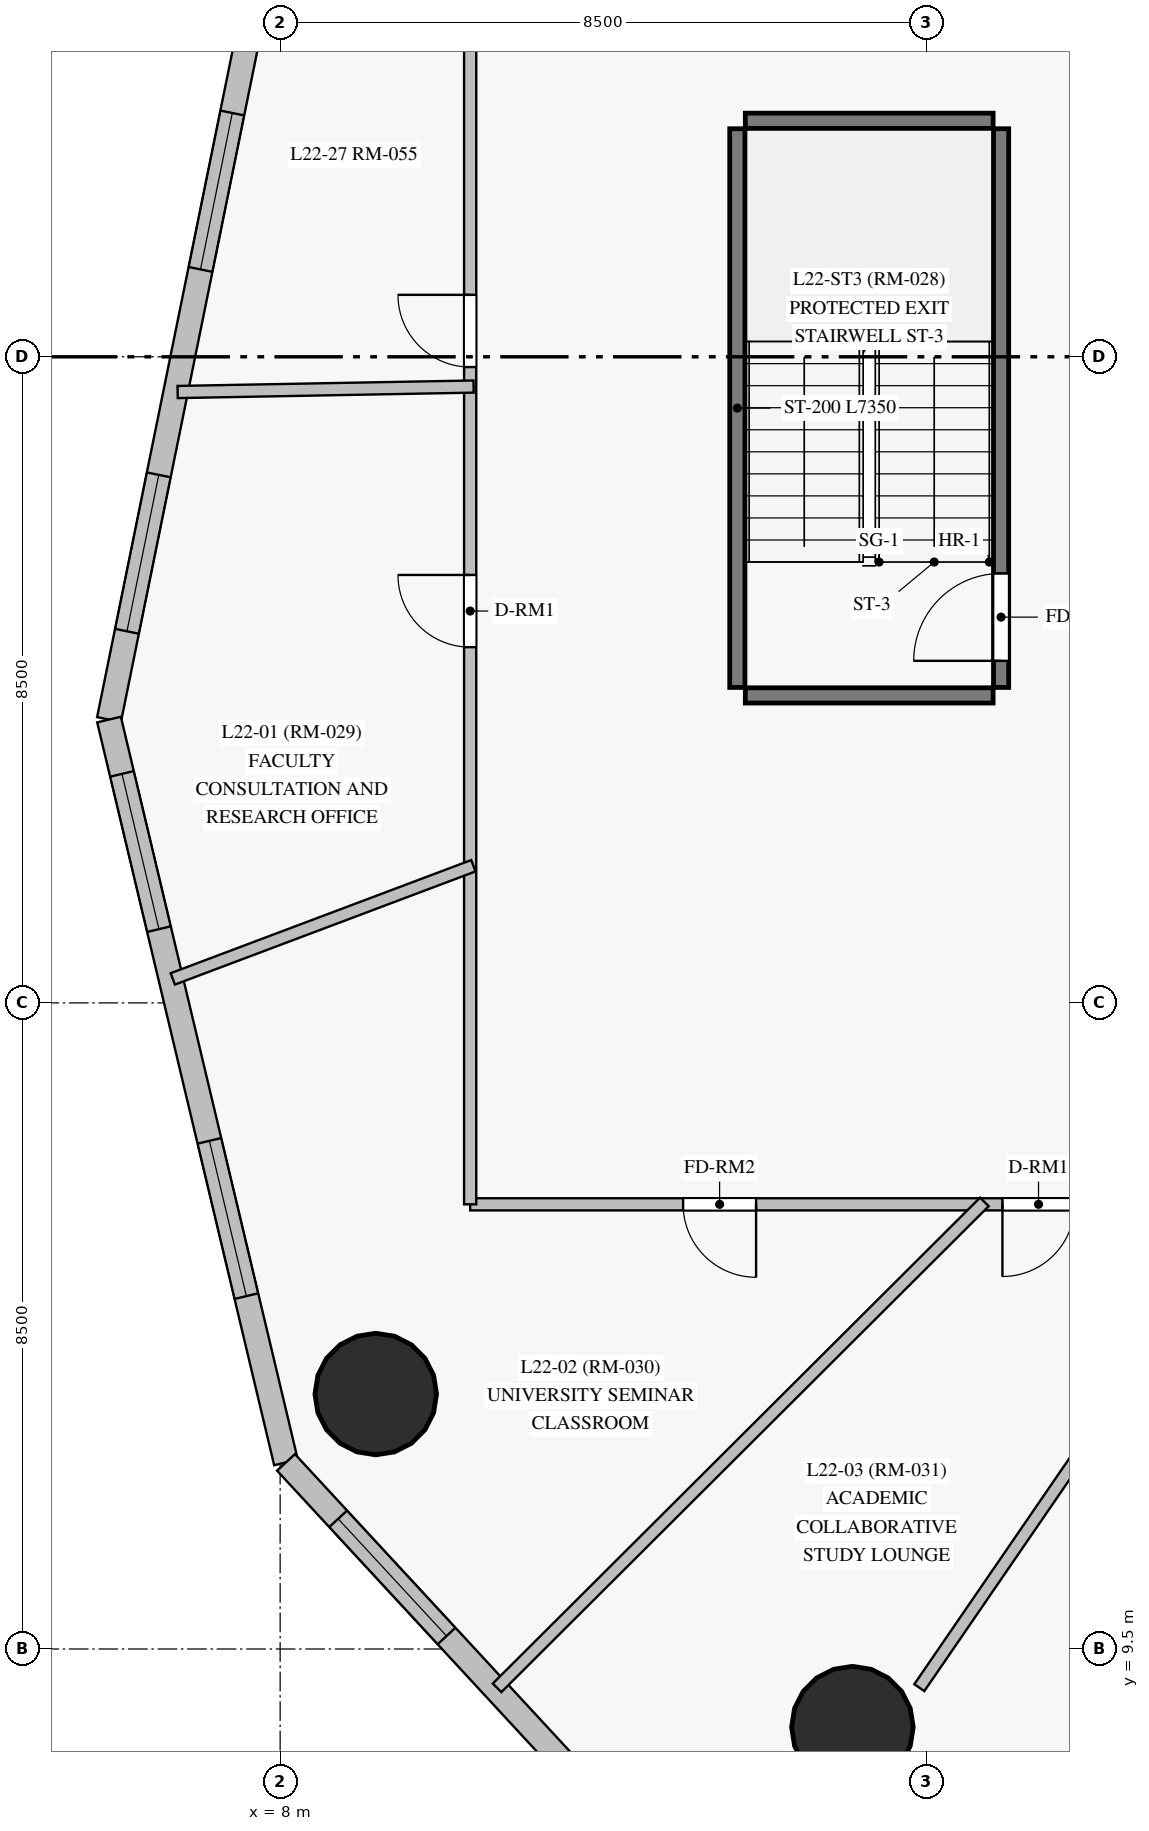
"""IFC4 building model, lengths in metres.
Left out: names, types, materials, properties, quantities, classifications, styles, units other than length and angle.
Written with IfcOpenShell. Run it as: python <this file> out.ifc"""

import sys

from ifc_helpers import new_model, si_unit, direction, frame, frame_2d, origin, origin_with_axes, origin_2d, place, context, subcontext, project, spatial, rectangle, circle, extrude, source, transform, mapped, element, fill, save


model = new_model("IFC4")
c1 = context("Model", 3, precision=1e-05, world=origin(), true_north=direction((0.0, 1.0)))
c2 = subcontext(c1, "Body", "Model", "MODEL_VIEW")
j1 = project(units=[si_unit("LENGTHUNIT", "METRE"), si_unit("PLANEANGLEUNIT", "RADIAN")], contexts=[c1])
p1 = place(None, origin())
s1 = spatial("IfcSite", under=j1, at=p1, CompositionType="ELEMENT")
p2 = place(p1, origin())
s2 = spatial("IfcBuilding", under=s1, at=p2, CompositionType="ELEMENT")
p3 = place(p2, frame((0.0, 0.0, 84.1)))
s3 = spatial("IfcBuildingStorey", under=s2, at=p3, CompositionType="ELEMENT", Elevation=84.1)
m1 = source(origin_with_axes(), c2, "Body", "SweptSolid", [
    extrude(circle(Radius=0.8, at=origin_2d()), origin(), (0.0, 0.0, 1.0), 3.6),
])
for number, where, z_axis, x_axis in (
    (1, (9.258, 12.854, 0.0), (0.0, 0.0, 1.0), (1.0, 0.0, 0.0)),
    (2, (15.529, 8.472, 0.0), (0.0, 0.0, 1.0), (1.0, 0.0, 0.0)),
):
    element("IfcColumn", number, at=place(p3, frame(where, z_axis=z_axis, x_axis=x_axis)), inside=s3, PredefinedType="COLUMN", context=c2, shape_type="MappedRepresentation", body=[
        mapped(m1, transform((0.0, 0.0, 0.0), scale=1.0)),
    ])
p4 = place(p3, frame((8.649, 35.997, 0.0), z_axis=(0.0, 0.0, 1.0), x_axis=(-0.199165339699, -0.979965901173, 0.0)))
e3 = element("IfcWall", 3, at=p4, inside=s3, PredefinedType="SOLIDWALL", context=c2, shape_type="SweptSolid", body=[
    extrude(rectangle(XDim=14.562, YDim=0.32, at=frame_2d((7.281, 0.0))), origin(), (0.0, 0.0, 1.0), 3.325),
])
p5 = place(p4, frame((1.693, 0.0, 0.85)))
e4 = element("IfcOpeningElement", 4, at=p5, cuts=e3, PredefinedType="OPENING", context=c2, shape_type="SweptSolid", body=[
    extrude(rectangle(XDim=2.1, YDim=1.95, at=frame_2d((1.05, 0.975))), frame((0.0, 0.17, 0.0), z_axis=(0.0, -1.0, 0.0), x_axis=(1.0, 0.0, 0.0)), (0.0, 0.0, 1.0), 0.34),
])
p6 = place(p4, frame((6.418, 0.0, 0.85)))
e5 = element("IfcOpeningElement", 5, at=p6, cuts=e3, PredefinedType="OPENING", context=c2, shape_type="SweptSolid", body=[
    extrude(rectangle(XDim=2.1, YDim=1.95, at=frame_2d((1.05, 0.975))), frame((0.0, 0.17, 0.0), z_axis=(0.0, -1.0, 0.0), x_axis=(1.0, 0.0, 0.0)), (0.0, 0.0, 1.0), 0.34),
])
p7 = place(p4, frame((11.276, 0.0, 0.85)))
e6 = element("IfcOpeningElement", 6, at=p7, cuts=e3, PredefinedType="OPENING", context=c2, shape_type="SweptSolid", body=[
    extrude(rectangle(XDim=2.1, YDim=1.95, at=frame_2d((1.05, 0.975))), frame((0.0, 0.17, 0.0), z_axis=(0.0, -1.0, 0.0), x_axis=(1.0, 0.0, 0.0)), (0.0, 0.0, 1.0), 0.34),
])
p8 = place(p3, frame((5.749, 21.728, 0.0), z_axis=(0.0, 0.0, 1.0), x_axis=(0.231742086711, -0.972777263944, 0.0)))
e7 = element("IfcWall", 7, at=p8, inside=s3, PredefinedType="SOLIDWALL", context=c2, shape_type="SweptSolid", body=[
    extrude(rectangle(XDim=10.046, YDim=0.32, at=frame_2d((5.023, 0.0))), origin(), (0.0, 0.0, 1.0), 3.325),
])
p9 = place(p8, frame((0.735, 0.0, 0.85)))
e8 = element("IfcOpeningElement", 8, at=p9, cuts=e7, PredefinedType="OPENING", context=c2, shape_type="SweptSolid", body=[
    extrude(rectangle(XDim=2.1, YDim=1.95, at=frame_2d((1.05, 0.975))), frame((0.0, 0.17, 0.0), z_axis=(0.0, -1.0, 0.0), x_axis=(1.0, 0.0, 0.0)), (0.0, 0.0, 1.0), 0.34),
])
p10 = place(p8, frame((5.698, 0.0, 0.85)))
e9 = element("IfcOpeningElement", 9, at=p10, cuts=e7, PredefinedType="OPENING", context=c2, shape_type="SweptSolid", body=[
    extrude(rectangle(XDim=2.1, YDim=1.95, at=frame_2d((1.05, 0.975))), frame((0.0, 0.17, 0.0), z_axis=(0.0, -1.0, 0.0), x_axis=(1.0, 0.0, 0.0)), (0.0, 0.0, 1.0), 0.34),
])
p11 = place(p3, frame((8.077, 11.955, 0.0), z_axis=(0.0, 0.0, 1.0), x_axis=(0.678985658744, -0.734151534235, 0.0)))
e10 = element("IfcWall", 10, at=p11, inside=s3, PredefinedType="SOLIDWALL", context=c2, shape_type="SweptSolid", body=[
    extrude(rectangle(XDim=12.498, YDim=0.32, at=frame_2d((6.249, 0.0))), origin(), (0.0, 0.0, 1.0), 3.325),
])
p12 = place(p11, frame((1.011, 0.0, 0.85)))
e11 = element("IfcOpeningElement", 11, at=p12, cuts=e10, PredefinedType="OPENING", context=c2, shape_type="SweptSolid", body=[
    extrude(rectangle(XDim=2.1, YDim=1.95, at=frame_2d((1.05, 0.975))), frame((0.0, 0.17, 0.0), z_axis=(0.0, -1.0, 0.0), x_axis=(1.0, 0.0, 0.0)), (0.0, 0.0, 1.0), 0.34),
])
p13 = place(p11, frame((5.356, 0.0, 0.85)))
e12 = element("IfcOpeningElement", 12, at=p13, cuts=e10, PredefinedType="OPENING", context=c2, shape_type="SweptSolid", body=[
    extrude(rectangle(XDim=2.1, YDim=1.95, at=frame_2d((1.05, 0.975))), frame((0.0, 0.17, 0.0), z_axis=(0.0, -1.0, 0.0), x_axis=(1.0, 0.0, 0.0)), (0.0, 0.0, 1.0), 0.34),
])
p14 = place(p11, frame((9.408, 0.0, 0.85)))
e13 = element("IfcOpeningElement", 13, at=p14, cuts=e10, PredefinedType="OPENING", context=c2, shape_type="SweptSolid", body=[
    extrude(rectangle(XDim=2.1, YDim=1.95, at=frame_2d((1.05, 0.975))), frame((0.0, 0.17, 0.0), z_axis=(0.0, -1.0, 0.0), x_axis=(1.0, 0.0, 0.0)), (0.0, 0.0, 1.0), 0.34),
])
p15 = place(p3, frame((14.015, 22.15, 0.0), z_axis=(0.0, 0.0, 1.0), x_axis=(0.0, 1.0, 0.0)))
e14 = element("IfcWall", 14, at=p15, inside=s3, PredefinedType="SHEAR", context=c2, shape_type="SweptSolid", body=[
    extrude(rectangle(XDim=7.35, YDim=0.2, at=frame_2d((3.675, 0.0))), origin(), (0.0, 0.0, 1.0), 3.325),
])
p16 = place(p3, frame((17.485, 22.15, 0.0), z_axis=(0.0, 0.0, 1.0), x_axis=(0.0, 1.0, 0.0)))
e15 = element("IfcWall", 15, at=p16, inside=s3, PredefinedType="SHEAR", context=c2, shape_type="SweptSolid", body=[
    extrude(rectangle(XDim=7.35, YDim=0.2, at=frame_2d((3.675, 0.0))), origin(), (0.0, 0.0, 1.0), 3.325),
])
p17 = place(p16, frame((0.35, 0.0, 0.0)))
e16 = element("IfcOpeningElement", 16, at=p17, cuts=e15, PredefinedType="OPENING", context=c2, shape_type="SweptSolid", body=[
    extrude(rectangle(XDim=1.15, YDim=2.15, at=frame_2d((0.575, 1.075))), frame((0.0, 0.11, 0.0), z_axis=(0.0, -1.0, 0.0), x_axis=(1.0, 0.0, 0.0)), (0.0, 0.0, 1.0), 0.22),
])
for number, where, z_axis, x_axis in (
    (17, (14.12, 22.045, 0.0), (0.0, 0.0, 1.0), (1.0, 0.0, 0.0)),
    (18, (14.12, 29.605, 0.0), (0.0, 0.0, 1.0), (1.0, 0.0, 0.0)),
):
    element("IfcWall", number, at=place(p3, frame(where, z_axis=z_axis, x_axis=x_axis)), inside=s3, PredefinedType="SHEAR", context=c2, shape_type="SweptSolid", body=[
        extrude(rectangle(XDim=3.26, YDim=0.2, at=frame_2d((1.63, 0.0))), origin(), (0.0, 0.0, 1.0), 3.325),
    ])
p18 = place(p3, frame((40.25, 15.35, 0.0), z_axis=(0.0, 0.0, 1.0), x_axis=(-1.0, 0.0, 0.0)))
e19 = element("IfcWall", 19, at=p18, inside=s3, PredefinedType="PARTITIONING", context=c2, shape_type="SweptSolid", body=[
    extrude(rectangle(XDim=29.75, YDim=0.16, at=frame_2d((14.875, 0.0))), origin(), (0.0, 0.0, 1.0), 2.675),
])
p19 = place(p18, frame((25.988, 0.0, 0.0)))
e20 = element("IfcOpeningElement", 20, at=p19, cuts=e19, PredefinedType="OPENING", context=c2, shape_type="SweptSolid", body=[
    extrude(rectangle(XDim=0.96, YDim=2.15, at=frame_2d((0.48, 1.075))), frame((0.0, 0.09, 0.0), z_axis=(0.0, -1.0, 0.0), x_axis=(1.0, 0.0, 0.0)), (0.0, 0.0, 1.0), 0.18),
])
p20 = place(p18, frame((21.798, 0.0, 0.0)))
e21 = element("IfcOpeningElement", 21, at=p20, cuts=e19, PredefinedType="OPENING", context=c2, shape_type="SweptSolid", body=[
    extrude(rectangle(XDim=0.95, YDim=2.15, at=frame_2d((0.475, 1.075))), frame((0.0, 0.09, 0.0), z_axis=(0.0, -1.0, 0.0), x_axis=(1.0, 0.0, 0.0)), (0.0, 0.0, 1.0), 0.18),
])
p21 = place(p18, frame((18.272, 0.0, 0.0)))
e22 = element("IfcOpeningElement", 22, at=p21, cuts=e19, PredefinedType="OPENING", context=c2, shape_type="SweptSolid", body=[
    extrude(rectangle(XDim=0.95, YDim=2.15, at=frame_2d((0.475, 1.075))), frame((0.0, 0.09, 0.0), z_axis=(0.0, -1.0, 0.0), x_axis=(1.0, 0.0, 0.0)), (0.0, 0.0, 1.0), 0.18),
])
p22 = place(p18, frame((15.977, 0.0, 0.0)))
e23 = element("IfcOpeningElement", 23, at=p22, cuts=e19, PredefinedType="OPENING", context=c2, shape_type="SweptSolid", body=[
    extrude(rectangle(XDim=0.95, YDim=2.15, at=frame_2d((0.475, 1.075))), frame((0.0, 0.09, 0.0), z_axis=(0.0, -1.0, 0.0), x_axis=(1.0, 0.0, 0.0)), (0.0, 0.0, 1.0), 0.18),
])
p23 = place(p18, frame((14.21, 0.0, 0.0)))
e24 = element("IfcOpeningElement", 24, at=p23, cuts=e19, PredefinedType="OPENING", context=c2, shape_type="SweptSolid", body=[
    extrude(rectangle(XDim=0.95, YDim=2.15, at=frame_2d((0.475, 1.075))), frame((0.0, 0.09, 0.0), z_axis=(0.0, -1.0, 0.0), x_axis=(1.0, 0.0, 0.0)), (0.0, 0.0, 1.0), 0.18),
])
p24 = place(p18, frame((9.938, 0.0, 0.0)))
e25 = element("IfcOpeningElement", 25, at=p24, cuts=e19, PredefinedType="OPENING", context=c2, shape_type="SweptSolid", body=[
    extrude(rectangle(XDim=0.95, YDim=2.15, at=frame_2d((0.475, 1.075))), frame((0.0, 0.09, 0.0), z_axis=(0.0, -1.0, 0.0), x_axis=(1.0, 0.0, 0.0)), (0.0, 0.0, 1.0), 0.18),
])
p25 = place(p18, frame((6.962, 0.0, 0.0)))
e26 = element("IfcOpeningElement", 26, at=p25, cuts=e19, PredefinedType="OPENING", context=c2, shape_type="SweptSolid", body=[
    extrude(rectangle(XDim=0.95, YDim=2.15, at=frame_2d((0.475, 1.075))), frame((0.0, 0.09, 0.0), z_axis=(0.0, -1.0, 0.0), x_axis=(1.0, 0.0, 0.0)), (0.0, 0.0, 1.0), 0.18),
])
p26 = place(p3, frame((10.5, 15.35, 0.0), z_axis=(0.0, 0.0, 1.0), x_axis=(0.0, 1.0, 0.0)))
e27 = element("IfcWall", 27, at=p26, inside=s3, PredefinedType="PARTITIONING", context=c2, shape_type="SweptSolid", body=[
    extrude(rectangle(XDim=22.3, YDim=0.16, at=frame_2d((11.15, 0.0))), origin(), (0.0, 0.0, 1.0), 2.725),
])
p27 = place(p26, frame((7.33, 0.0, 0.0)))
e28 = element("IfcOpeningElement", 28, at=p27, cuts=e27, PredefinedType="OPENING", context=c2, shape_type="SweptSolid", body=[
    extrude(rectangle(XDim=0.95, YDim=2.15, at=frame_2d((0.475, 1.075))), frame((0.0, 0.09, 0.0), z_axis=(0.0, -1.0, 0.0), x_axis=(1.0, 0.0, 0.0)), (0.0, 0.0, 1.0), 0.18),
])
p28 = place(p26, frame((11.015, 0.0, 0.0)))
e29 = element("IfcOpeningElement", 29, at=p28, cuts=e27, PredefinedType="OPENING", context=c2, shape_type="SweptSolid", body=[
    extrude(rectangle(XDim=0.95, YDim=2.15, at=frame_2d((0.475, 1.075))), frame((0.0, 0.09, 0.0), z_axis=(0.0, -1.0, 0.0), x_axis=(1.0, 0.0, 0.0)), (0.0, 0.0, 1.0), 0.18),
])
p29 = place(p3, frame((22.721, 15.39, 0.0), z_axis=(0.0, 0.0, 1.0), x_axis=(-0.457243193553, -0.889341701456, 0.0)))
e30 = element("IfcWall", 30, at=p29, inside=s3, PredefinedType="PARTITIONING", context=c2, shape_type="SweptSolid", body=[
    extrude(rectangle(XDim=13.894, YDim=0.16, at=frame_2d((6.947, 0.0))), origin(), (0.0, 0.0, 1.0), 3.325),
])
p30 = place(p3, frame((17.265, 15.382, 0.0), z_axis=(0.0, 0.0, 1.0), x_axis=(-0.708103786382, -0.706108368249, 0.0)))
e31 = element("IfcWall", 31, at=p30, inside=s3, PredefinedType="PARTITIONING", context=c2, shape_type="SweptSolid", body=[
    extrude(rectangle(XDim=9.054, YDim=0.16, at=frame_2d((4.527, 0.0))), origin(), (0.0, 0.0, 1.0), 3.325),
])
p31 = place(p3, frame((20.799, 15.387, 0.0), z_axis=(0.0, 0.0, 1.0), x_axis=(-0.565927650829, -0.824454907213, 0.0)))
e32 = element("IfcWall", 32, at=p31, inside=s3, PredefinedType="PARTITIONING", context=c2, shape_type="SweptSolid", body=[
    extrude(rectangle(XDim=7.758, YDim=0.16, at=frame_2d((3.879, 0.0))), origin(), (0.0, 0.0, 1.0), 2.675),
])
p32 = place(p3, frame((10.542, 19.804, 0.0), z_axis=(0.0, 0.0, 1.0), x_axis=(-0.935889146013, -0.35229463007, 0.0)))
e33 = element("IfcWall", 33, at=p32, inside=s3, PredefinedType="PARTITIONING", context=c2, shape_type="SweptSolid", body=[
    extrude(rectangle(XDim=4.225, YDim=0.16, at=frame_2d((2.113, 0.0))), origin(), (0.0, 0.0, 1.0), 3.325),
])
p33 = place(p3, frame((6.652, 26.037, 0.0), z_axis=(0.0, 0.0, 1.0), x_axis=(0.999830141578, 0.018430626473, 0.0)))
e34 = element("IfcWall", 34, at=p33, inside=s3, PredefinedType="PARTITIONING", context=c2, shape_type="SweptSolid", body=[
    extrude(rectangle(XDim=3.895, YDim=0.16, at=frame_2d((1.947, 0.0))), origin(), (0.0, 0.0, 1.0), 3.325),
])
m2 = source(origin_with_axes(), c2, "Body", "SweptSolid", [
    extrude(rectangle(XDim=2.1, YDim=1.95, at=frame_2d((1.05, 0.975))), frame((0.0, 0.03, 0.0), z_axis=(0.0, -1.0, 0.0), x_axis=(1.0, 0.0, 0.0)), (0.0, 0.0, 1.0), 0.06),
])
p34 = place(p6, origin())
e35 = element("IfcWindow", 35, at=p34, inside=s3, PartitioningType="SINGLE_PANEL", PredefinedType="WINDOW", context=c2, shape_type="MappedRepresentation", body=[
    mapped(m2, transform((0.0, 0.0, 0.0), scale=1.0)),
])
fill(e5, e35)
p35 = place(p7, origin())
e36 = element("IfcWindow", 36, at=p35, inside=s3, PartitioningType="SINGLE_PANEL", PredefinedType="WINDOW", context=c2, shape_type="MappedRepresentation", body=[
    mapped(m2, transform((0.0, 0.0, 0.0), scale=1.0)),
])
fill(e6, e36)
p36 = place(p9, origin())
e37 = element("IfcWindow", 37, at=p36, inside=s3, PartitioningType="SINGLE_PANEL", PredefinedType="WINDOW", context=c2, shape_type="MappedRepresentation", body=[
    mapped(m2, transform((0.0, 0.0, 0.0), scale=1.0)),
])
fill(e8, e37)
p37 = place(p10, origin())
e38 = element("IfcWindow", 38, at=p37, inside=s3, PartitioningType="SINGLE_PANEL", PredefinedType="WINDOW", context=c2, shape_type="MappedRepresentation", body=[
    mapped(m2, transform((0.0, 0.0, 0.0), scale=1.0)),
])
fill(e9, e38)
p38 = place(p12, origin())
e39 = element("IfcWindow", 39, at=p38, inside=s3, PartitioningType="SINGLE_PANEL", PredefinedType="WINDOW", context=c2, shape_type="MappedRepresentation", body=[
    mapped(m2, transform((0.0, 0.0, 0.0), scale=1.0)),
])
fill(e11, e39)
m3 = source(origin_with_axes(), c2, "Body", "SweptSolid", [
    extrude(rectangle(XDim=1.15, YDim=2.15, at=frame_2d((0.575, 1.075))), frame((0.0, 0.025, 0.0), z_axis=(0.0, -1.0, 0.0), x_axis=(1.0, 0.0, 0.0)), (0.0, 0.0, 1.0), 0.05),
])
p39 = place(p17, origin())
e40 = element("IfcDoor", 40, at=p39, inside=s3, OperationType="SINGLE_SWING_LEFT", PredefinedType="DOOR", context=c2, shape_type="MappedRepresentation", body=[
    mapped(m3, transform((0.0, 0.0, 0.0), scale=1.0)),
])
fill(e16, e40)
m4 = source(origin_with_axes(), c2, "Body", "SweptSolid", [
    extrude(rectangle(XDim=0.95, YDim=2.15, at=frame_2d((0.475, 1.075))), frame((0.0, 0.025, 0.0), z_axis=(0.0, -1.0, 0.0), x_axis=(1.0, 0.0, 0.0)), (0.0, 0.0, 1.0), 0.05),
])
p40 = place(p27, origin())
e41 = element("IfcDoor", 41, at=p40, inside=s3, OperationType="SINGLE_SWING_RIGHT", PredefinedType="DOOR", context=c2, shape_type="MappedRepresentation", body=[
    mapped(m4, transform((0.0, 0.0, 0.0), scale=1.0)),
])
fill(e28, e41)
m5 = source(origin_with_axes(), c2, "Body", "SweptSolid", [
    extrude(rectangle(XDim=0.96, YDim=2.15, at=frame_2d((0.48, 1.075))), frame((0.0, 0.025, 0.0), z_axis=(0.0, -1.0, 0.0), x_axis=(1.0, 0.0, 0.0)), (0.0, 0.0, 1.0), 0.05),
])
p41 = place(p19, origin())
e42 = element("IfcDoor", 42, at=p41, inside=s3, OperationType="SINGLE_SWING_LEFT", PredefinedType="DOOR", context=c2, shape_type="MappedRepresentation", body=[
    mapped(m5, transform((0.0, 0.0, 0.0), scale=1.0)),
])
fill(e20, e42)
p42 = place(p20, origin())
e43 = element("IfcDoor", 43, at=p42, inside=s3, OperationType="SINGLE_SWING_RIGHT", PredefinedType="DOOR", context=c2, shape_type="MappedRepresentation", body=[
    mapped(m4, transform((0.0, 0.0, 0.0), scale=1.0)),
])
fill(e21, e43)
p43 = place(p28, origin())
e44 = element("IfcDoor", 44, at=p43, inside=s3, OperationType="SINGLE_SWING_RIGHT", PredefinedType="DOOR", context=c2, shape_type="MappedRepresentation", body=[
    mapped(m4, transform((0.0, 0.0, 0.0), scale=1.0)),
])
fill(e29, e44)
save(model, sys.argv[1])
